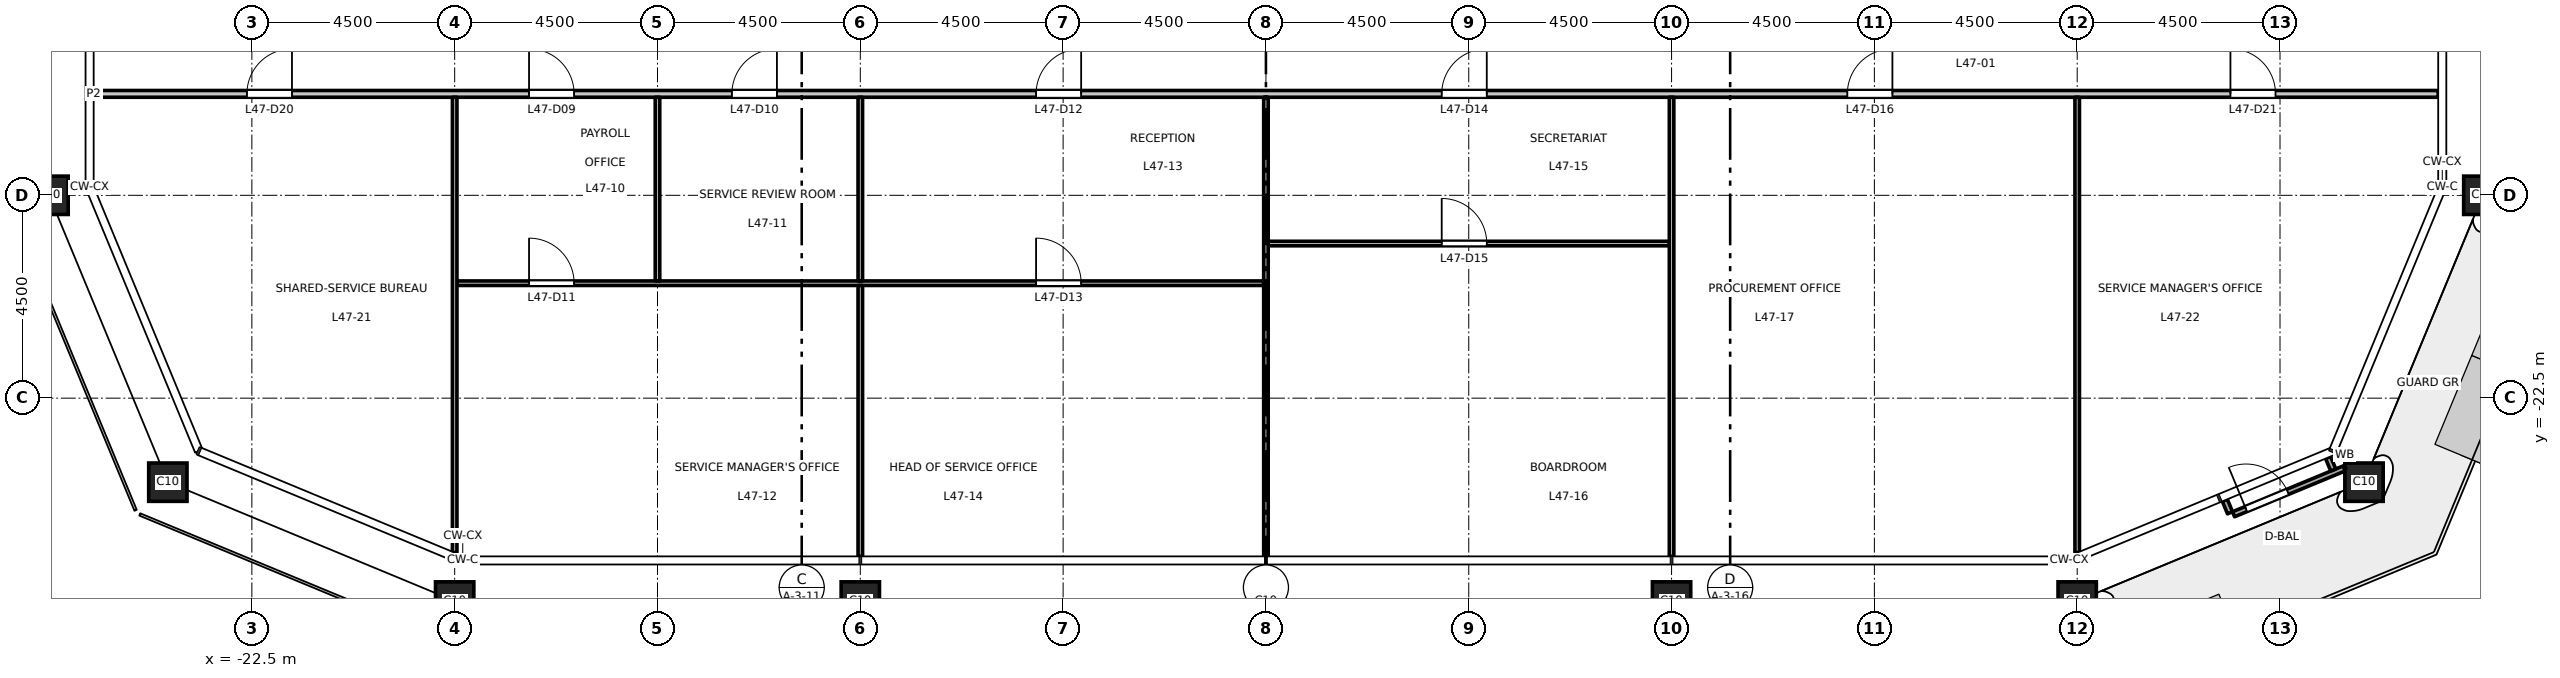
"""IFC4 building model, lengths in metres.
Left out: names, types, materials, properties, quantities, classifications, styles, units other than length and angle.
Written with IfcOpenShell. Run it as: python <this file> out.ifc"""

import sys

from ifc_helpers import new_model, si_unit, direction, frame, frame_2d, origin, origin_2d, place, context, subcontext, project, spatial, rectangle, hollow_rectangle, extrude, element, fill, save


model = new_model("IFC4")
c1 = context("Model", 3, precision=1e-05, world=origin(), true_north=direction((0.0, 1.0)))
c2 = subcontext(c1, "Body", "Model", "MODEL_VIEW")
j1 = project(units=[si_unit("LENGTHUNIT", "METRE"), si_unit("PLANEANGLEUNIT", "RADIAN")], contexts=[c1])
p1 = place(None, origin())
s1 = spatial("IfcSite", under=j1, at=p1, CompositionType="ELEMENT")
p2 = place(p1, origin())
s2 = spatial("IfcBuilding", under=s1, at=p2, CompositionType="ELEMENT")
p3 = place(p2, frame((0.0, 0.0, 219.7)))
s3 = spatial("IfcBuildingStorey", under=s2, at=p3, CompositionType="ELEMENT", Elevation=219.7)
for number, where, z_axis, x_axis in (
    (1, (-18.0, -27.0, 0.0), (0.0, 0.0, 1.0), (1.0, 0.0, 0.0)),
    (2, (-9.0, -27.0, 0.0), (0.0, 0.0, 1.0), (1.0, 0.0, 0.0)),
    (3, (0.0, -27.0, 0.0), (0.0, 0.0, 1.0), (1.0, 0.0, 0.0)),
    (4, (9.0, -27.0, 0.0), (0.0, 0.0, 1.0), (1.0, 0.0, 0.0)),
    (5, (18.0, -27.0, 0.0), (0.0, 0.0, 1.0), (1.0, 0.0, 0.0)),
    (6, (24.364, -24.364, 0.0), (0.0, 0.0, 1.0), (1.0, 0.0, 0.0)),
    (7, (27.0, -18.0, 0.0), (0.0, 0.0, 1.0), (1.0, 0.0, 0.0)),
    (8, (-27.0, -18.0, 0.0), (0.0, 0.0, 1.0), (1.0, 0.0, 0.0)),
    (9, (-24.364, -24.364, 0.0), (0.0, 0.0, 1.0), (1.0, 0.0, 0.0)),
):
    element("IfcColumn", number, at=place(p3, frame(where, z_axis=z_axis, x_axis=x_axis)), inside=s3, PredefinedType="COLUMN", context=c2, shape_type="SweptSolid", body=[
        extrude(hollow_rectangle(XDim=0.85, YDim=0.85, WallThickness=0.05, at=origin_2d()), origin(), (0.0, 0.0, 1.0), 4.5),
    ])
p4 = place(p3, frame((21.276, -24.766, 0.0), z_axis=(0.0, 0.0, 1.0), x_axis=(0.382591441855, -0.923917630863, 0.0)))
e10 = element("IfcWall", 10, at=p4, inside=s3, PredefinedType="STANDARD", context=c2, shape_type="SweptSolid", body=[
    extrude(rectangle(XDim=0.3, YDim=0.12, at=frame_2d((0.15, 0.0))), origin(), (0.0, 0.0, 1.0), 4.35),
])
p5 = place(p3, frame((23.566, -23.818, 0.0), z_axis=(0.0, 0.0, 1.0), x_axis=(0.383285987724, -0.923629715641, 0.0)))
e11 = element("IfcWall", 11, at=p5, inside=s3, PredefinedType="STANDARD", context=c2, shape_type="SweptSolid", body=[
    extrude(rectangle(XDim=0.3, YDim=0.12, at=frame_2d((0.15, 0.0))), origin(), (0.0, 0.0, 1.0), 4.35),
])
p6 = place(p3, frame((21.469, -25.076, 0.0), z_axis=(0.0, 0.0, 1.0), x_axis=(0.923898858671, 0.382636771556, 0.0)))
e12 = element("IfcWall", 12, at=p6, inside=s3, PredefinedType="STANDARD", context=c2, shape_type="SweptSolid", body=[
    extrude(rectangle(XDim=2.673, YDim=0.12, at=frame_2d((1.337, 0.0))), origin(), (0.0, 0.0, 1.0), 4.35),
])
p7 = place(p6, frame((0.3, 0.0, 0.0)))
e13 = element("IfcOpeningElement", 13, at=p7, cuts=e12, PredefinedType="OPENING", context=c2, shape_type="SweptSolid", body=[
    extrude(rectangle(XDim=1.0, YDim=2.4, at=frame_2d((0.5, 1.2))), frame((0.0, 0.07, 0.0), z_axis=(0.0, -1.0, 0.0), x_axis=(1.0, 0.0, 0.0)), (0.0, 0.0, 1.0), 0.14),
])
p8 = place(p3, frame((-17.95, -19.95, 0.0), z_axis=(0.0, 0.0, 1.0), x_axis=(1.0, 0.0, 0.0)))
e14 = element("IfcWall", 14, at=p8, inside=s3, PredefinedType="PARTITIONING", context=c2, shape_type="SweptSolid", body=[
    extrude(rectangle(XDim=17.9, YDim=0.1, at=frame_2d((8.95, 0.0))), origin(), (0.0, 0.0, 1.0), 4.35),
])
p9 = place(p8, frame((1.6, 0.0, 0.0)))
e15 = element("IfcOpeningElement", 15, at=p9, cuts=e14, PredefinedType="OPENING", context=c2, shape_type="SweptSolid", body=[
    extrude(rectangle(XDim=1.0, YDim=2.1, at=frame_2d((0.5, 1.05))), frame((0.0, 0.06, 0.0), z_axis=(0.0, -1.0, 0.0), x_axis=(1.0, 0.0, 0.0)), (0.0, 0.0, 1.0), 0.12),
])
p10 = place(p8, frame((12.85, 0.0, 0.0)))
e16 = element("IfcOpeningElement", 16, at=p10, cuts=e14, PredefinedType="OPENING", context=c2, shape_type="SweptSolid", body=[
    extrude(rectangle(XDim=1.0, YDim=2.1, at=frame_2d((0.5, 1.05))), frame((0.0, 0.06, 0.0), z_axis=(0.0, -1.0, 0.0), x_axis=(1.0, 0.0, 0.0)), (0.0, 0.0, 1.0), 0.12),
])
p11 = place(p3, frame((0.05, -19.07, 0.0), z_axis=(0.0, 0.0, 1.0), x_axis=(1.0, 0.0, 0.0)))
e17 = element("IfcWall", 17, at=p11, inside=s3, PredefinedType="PARTITIONING", context=c2, shape_type="SweptSolid", body=[
    extrude(rectangle(XDim=8.9, YDim=0.1, at=frame_2d((4.45, 0.0))), origin(), (0.0, 0.0, 1.0), 4.35),
])
p12 = place(p11, frame((3.85, 0.0, 0.0)))
e18 = element("IfcOpeningElement", 18, at=p12, cuts=e17, PredefinedType="OPENING", context=c2, shape_type="SweptSolid", body=[
    extrude(rectangle(XDim=1.0, YDim=2.1, at=frame_2d((0.5, 1.05))), frame((0.0, 0.06, 0.0), z_axis=(0.0, -1.0, 0.0), x_axis=(1.0, 0.0, 0.0)), (0.0, 0.0, 1.0), 0.12),
])
p13 = place(p3, frame((-26.01, -15.75, 0.0), z_axis=(0.0, 0.0, 1.0), x_axis=(1.0, 0.0, 0.0)))
e19 = element("IfcWall", 19, at=p13, inside=s3, PredefinedType="PARTITIONING", context=c2, shape_type="SweptSolid", body=[
    extrude(rectangle(XDim=52.02, YDim=0.15, at=frame_2d((26.01, 0.0))), origin(), (0.0, 0.0, 1.0), 4.35),
])
p14 = place(p13, frame((9.66, 0.0, 0.0)))
e20 = element("IfcOpeningElement", 20, at=p14, cuts=e19, PredefinedType="OPENING", context=c2, shape_type="SweptSolid", body=[
    extrude(rectangle(XDim=1.0, YDim=2.1, at=frame_2d((0.5, 1.05))), frame((0.0, 0.085, 0.0), z_axis=(0.0, -1.0, 0.0), x_axis=(1.0, 0.0, 0.0)), (0.0, 0.0, 1.0), 0.17),
])
p15 = place(p13, frame((14.16, 0.0, 0.0)))
e21 = element("IfcOpeningElement", 21, at=p15, cuts=e19, PredefinedType="OPENING", context=c2, shape_type="SweptSolid", body=[
    extrude(rectangle(XDim=1.0, YDim=2.1, at=frame_2d((0.5, 1.05))), frame((0.0, 0.085, 0.0), z_axis=(0.0, -1.0, 0.0), x_axis=(1.0, 0.0, 0.0)), (0.0, 0.0, 1.0), 0.17),
])
p16 = place(p13, frame((20.91, 0.0, 0.0)))
e22 = element("IfcOpeningElement", 22, at=p16, cuts=e19, PredefinedType="OPENING", context=c2, shape_type="SweptSolid", body=[
    extrude(rectangle(XDim=1.0, YDim=2.1, at=frame_2d((0.5, 1.05))), frame((0.0, 0.085, 0.0), z_axis=(0.0, -1.0, 0.0), x_axis=(1.0, 0.0, 0.0)), (0.0, 0.0, 1.0), 0.17),
])
p17 = place(p13, frame((29.91, 0.0, 0.0)))
e23 = element("IfcOpeningElement", 23, at=p17, cuts=e19, PredefinedType="OPENING", context=c2, shape_type="SweptSolid", body=[
    extrude(rectangle(XDim=1.0, YDim=2.1, at=frame_2d((0.5, 1.05))), frame((0.0, 0.085, 0.0), z_axis=(0.0, -1.0, 0.0), x_axis=(1.0, 0.0, 0.0)), (0.0, 0.0, 1.0), 0.17),
])
p18 = place(p13, frame((38.91, 0.0, 0.0)))
e24 = element("IfcOpeningElement", 24, at=p18, cuts=e19, PredefinedType="OPENING", context=c2, shape_type="SweptSolid", body=[
    extrude(rectangle(XDim=1.0, YDim=2.1, at=frame_2d((0.5, 1.05))), frame((0.0, 0.085, 0.0), z_axis=(0.0, -1.0, 0.0), x_axis=(1.0, 0.0, 0.0)), (0.0, 0.0, 1.0), 0.17),
])
p19 = place(p13, frame((3.4, 0.0, 0.0)))
e25 = element("IfcOpeningElement", 25, at=p19, cuts=e19, PredefinedType="OPENING", context=c2, shape_type="SweptSolid", body=[
    extrude(rectangle(XDim=1.0, YDim=2.1, at=frame_2d((0.5, 1.05))), frame((0.0, 0.085, 0.0), z_axis=(0.0, -1.0, 0.0), x_axis=(1.0, 0.0, 0.0)), (0.0, 0.0, 1.0), 0.17),
])
p20 = place(p13, frame((47.41, 0.0, 0.0)))
e26 = element("IfcOpeningElement", 26, at=p20, cuts=e19, PredefinedType="OPENING", context=c2, shape_type="SweptSolid", body=[
    extrude(rectangle(XDim=1.0, YDim=2.1, at=frame_2d((0.5, 1.05))), frame((0.0, 0.085, 0.0), z_axis=(0.0, -1.0, 0.0), x_axis=(1.0, 0.0, 0.0)), (0.0, 0.0, 1.0), 0.17),
])
p21 = place(p3, frame((-18.0, -25.928, 0.0), z_axis=(0.0, 0.0, 1.0), x_axis=(0.0, 1.0, 0.0)))
e27 = element("IfcWall", 27, at=p21, inside=s3, PredefinedType="PARTITIONING", context=c2, shape_type="SweptSolid", body=[
    extrude(rectangle(XDim=10.103, YDim=0.1, at=frame_2d((5.052, 0.0))), origin(), (0.0, 0.0, 1.0), 3.65),
])
p22 = place(p3, frame((-13.5, -19.9, 0.0), z_axis=(0.0, 0.0, 1.0), x_axis=(0.0, 1.0, 0.0)))
e28 = element("IfcWall", 28, at=p22, inside=s3, PredefinedType="PARTITIONING", context=c2, shape_type="SweptSolid", body=[
    extrude(rectangle(XDim=4.075, YDim=0.1, at=frame_2d((2.038, 0.0))), origin(), (0.0, 0.0, 1.0), 4.35),
])
p23 = place(p3, frame((-9.0, -26.01, 0.0), z_axis=(0.0, 0.0, 1.0), x_axis=(0.0, 1.0, 0.0)))
e29 = element("IfcWall", 29, at=p23, inside=s3, PredefinedType="PARTITIONING", context=c2, shape_type="SweptSolid", body=[
    extrude(rectangle(XDim=6.01, YDim=0.1, at=frame_2d((3.005, 0.0))), origin(), (0.0, 0.0, 1.0), 3.65),
])
p24 = place(p3, frame((-9.0, -19.9, 0.0), z_axis=(0.0, 0.0, 1.0), x_axis=(0.0, 1.0, 0.0)))
e30 = element("IfcWall", 30, at=p24, inside=s3, PredefinedType="PARTITIONING", context=c2, shape_type="SweptSolid", body=[
    extrude(rectangle(XDim=4.075, YDim=0.1, at=frame_2d((2.038, 0.0))), origin(), (0.0, 0.0, 1.0), 3.65),
])
p25 = place(p3, frame((0.0, -26.01, 0.0), z_axis=(0.0, 0.0, 1.0), x_axis=(0.0, 1.0, 0.0)))
e31 = element("IfcWall", 31, at=p25, inside=s3, PredefinedType="PARTITIONING", context=c2, shape_type="SweptSolid", body=[
    extrude(rectangle(XDim=10.185, YDim=0.1, at=frame_2d((5.093, 0.0))), origin(), (0.0, 0.0, 1.0), 3.55),
])
p26 = place(p3, frame((9.0, -26.01, 0.0), z_axis=(0.0, 0.0, 1.0), x_axis=(0.0, 1.0, 0.0)))
e32 = element("IfcWall", 32, at=p26, inside=s3, PredefinedType="PARTITIONING", context=c2, shape_type="SweptSolid", body=[
    extrude(rectangle(XDim=10.185, YDim=0.1, at=frame_2d((5.093, 0.0))), origin(), (0.0, 0.0, 1.0), 3.65),
])
p27 = place(p3, frame((18.0, -25.928, 0.0), z_axis=(0.0, 0.0, 1.0), x_axis=(0.0, 1.0, 0.0)))
e33 = element("IfcWall", 33, at=p27, inside=s3, PredefinedType="PARTITIONING", context=c2, shape_type="SweptSolid", body=[
    extrude(rectangle(XDim=10.103, YDim=0.1, at=frame_2d((5.052, 0.0))), origin(), (0.0, 0.0, 1.0), 3.65),
])
p28 = place(p7, origin())
e34 = element("IfcDoor", 34, at=p28, inside=s3, OperationType="SINGLE_SWING_LEFT", PredefinedType="DOOR", context=c2, shape_type="SweptSolid", body=[
    extrude(rectangle(XDim=1.0, YDim=2.4, at=frame_2d((0.5, 1.2))), frame((0.0, 0.025, 0.0), z_axis=(0.0, -1.0, 0.0), x_axis=(1.0, 0.0, 0.0)), (0.0, 0.0, 1.0), 0.05),
])
fill(e13, e34)
p29 = place(p14, origin())
e35 = element("IfcDoor", 35, at=p29, inside=s3, OperationType="SINGLE_SWING_LEFT", PredefinedType="DOOR", context=c2, shape_type="SweptSolid", body=[
    extrude(rectangle(XDim=1.0, YDim=2.1, at=frame_2d((0.5, 1.05))), frame((0.0, 0.025, 0.0), z_axis=(0.0, -1.0, 0.0), x_axis=(1.0, 0.0, 0.0)), (0.0, 0.0, 1.0), 0.05),
])
fill(e20, e35)
p30 = place(p15, origin())
e36 = element("IfcDoor", 36, at=p30, inside=s3, OperationType="SINGLE_SWING_RIGHT", PredefinedType="DOOR", context=c2, shape_type="SweptSolid", body=[
    extrude(rectangle(XDim=1.0, YDim=2.1, at=frame_2d((0.5, 1.05))), frame((0.0, 0.025, 0.0), z_axis=(0.0, -1.0, 0.0), x_axis=(1.0, 0.0, 0.0)), (0.0, 0.0, 1.0), 0.05),
])
fill(e21, e36)
p31 = place(p9, origin())
e37 = element("IfcDoor", 37, at=p31, inside=s3, OperationType="SINGLE_SWING_LEFT", PredefinedType="DOOR", context=c2, shape_type="SweptSolid", body=[
    extrude(rectangle(XDim=1.0, YDim=2.1, at=frame_2d((0.5, 1.05))), frame((0.0, 0.025, 0.0), z_axis=(0.0, -1.0, 0.0), x_axis=(1.0, 0.0, 0.0)), (0.0, 0.0, 1.0), 0.05),
])
fill(e15, e37)
p32 = place(p16, origin())
e38 = element("IfcDoor", 38, at=p32, inside=s3, OperationType="SINGLE_SWING_RIGHT", PredefinedType="DOOR", context=c2, shape_type="SweptSolid", body=[
    extrude(rectangle(XDim=1.0, YDim=2.1, at=frame_2d((0.5, 1.05))), frame((0.0, 0.025, 0.0), z_axis=(0.0, -1.0, 0.0), x_axis=(1.0, 0.0, 0.0)), (0.0, 0.0, 1.0), 0.05),
])
fill(e22, e38)
p33 = place(p10, origin())
e39 = element("IfcDoor", 39, at=p33, inside=s3, OperationType="SINGLE_SWING_LEFT", PredefinedType="DOOR", context=c2, shape_type="SweptSolid", body=[
    extrude(rectangle(XDim=1.0, YDim=2.1, at=frame_2d((0.5, 1.05))), frame((0.0, 0.025, 0.0), z_axis=(0.0, -1.0, 0.0), x_axis=(1.0, 0.0, 0.0)), (0.0, 0.0, 1.0), 0.05),
])
fill(e16, e39)
p34 = place(p17, origin())
e40 = element("IfcDoor", 40, at=p34, inside=s3, OperationType="SINGLE_SWING_RIGHT", PredefinedType="DOOR", context=c2, shape_type="SweptSolid", body=[
    extrude(rectangle(XDim=1.0, YDim=2.1, at=frame_2d((0.5, 1.05))), frame((0.0, 0.025, 0.0), z_axis=(0.0, -1.0, 0.0), x_axis=(1.0, 0.0, 0.0)), (0.0, 0.0, 1.0), 0.05),
])
fill(e23, e40)
p35 = place(p12, origin())
e41 = element("IfcDoor", 41, at=p35, inside=s3, OperationType="SINGLE_SWING_LEFT", PredefinedType="DOOR", context=c2, shape_type="SweptSolid", body=[
    extrude(rectangle(XDim=1.0, YDim=2.1, at=frame_2d((0.5, 1.05))), frame((0.0, 0.025, 0.0), z_axis=(0.0, -1.0, 0.0), x_axis=(1.0, 0.0, 0.0)), (0.0, 0.0, 1.0), 0.05),
])
fill(e18, e41)
p36 = place(p18, origin())
e42 = element("IfcDoor", 42, at=p36, inside=s3, OperationType="SINGLE_SWING_RIGHT", PredefinedType="DOOR", context=c2, shape_type="SweptSolid", body=[
    extrude(rectangle(XDim=1.0, YDim=2.1, at=frame_2d((0.5, 1.05))), frame((0.0, 0.025, 0.0), z_axis=(0.0, -1.0, 0.0), x_axis=(1.0, 0.0, 0.0)), (0.0, 0.0, 1.0), 0.05),
])
fill(e24, e42)
p37 = place(p19, origin())
e43 = element("IfcDoor", 43, at=p37, inside=s3, OperationType="SINGLE_SWING_RIGHT", PredefinedType="DOOR", context=c2, shape_type="SweptSolid", body=[
    extrude(rectangle(XDim=1.0, YDim=2.1, at=frame_2d((0.5, 1.05))), frame((0.0, 0.025, 0.0), z_axis=(0.0, -1.0, 0.0), x_axis=(1.0, 0.0, 0.0)), (0.0, 0.0, 1.0), 0.05),
])
fill(e25, e43)
p38 = place(p20, origin())
e44 = element("IfcDoor", 44, at=p38, inside=s3, OperationType="SINGLE_SWING_LEFT", PredefinedType="DOOR", context=c2, shape_type="SweptSolid", body=[
    extrude(rectangle(XDim=1.0, YDim=2.1, at=frame_2d((0.5, 1.05))), frame((0.0, 0.025, 0.0), z_axis=(0.0, -1.0, 0.0), x_axis=(1.0, 0.0, 0.0)), (0.0, 0.0, 1.0), 0.05),
])
fill(e26, e44)
save(model, sys.argv[1])
